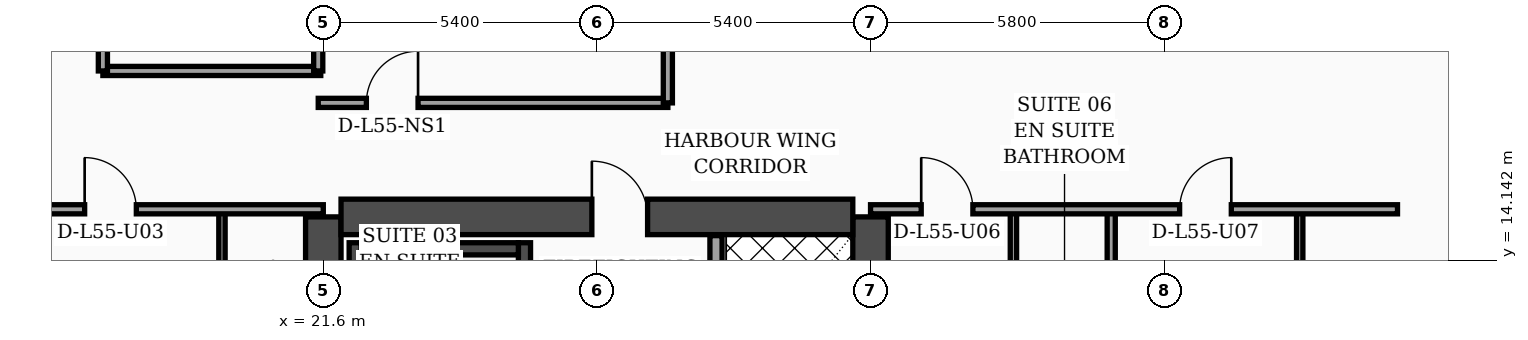
"""IFC4 building model, lengths in metres.
Left out: names, types, materials, properties, quantities, classifications, styles, units other than length and angle.
Written with IfcOpenShell. Run it as: python <this file> out.ifc"""

import sys

from ifc_helpers import new_model, si_unit, direction, frame, frame_2d, origin, place, context, subcontext, project, spatial, rectangle, extrude, element, fill, save


model = new_model("IFC4")
c1 = context("Model", 3, precision=1e-05, world=origin(), true_north=direction((0.0, 1.0)))
c2 = subcontext(c1, "Body", "Model", "MODEL_VIEW")
j1 = project(units=[si_unit("LENGTHUNIT", "METRE"), si_unit("PLANEANGLEUNIT", "RADIAN")], contexts=[c1])
p1 = place(None, origin())
s1 = spatial("IfcSite", under=j1, at=p1, CompositionType="ELEMENT")
p2 = place(p1, origin())
s2 = spatial("IfcBuilding", under=s1, at=p2, CompositionType="ELEMENT")
p3 = place(p2, frame((0.0, 0.0, 223.1)))
s3 = spatial("IfcBuildingStorey", under=s2, at=p3, CompositionType="ELEMENT", Elevation=223.1)
for number, where, z_axis, x_axis in (
    (1, (21.6, 4.6, 0.0), (0.0, 0.0, 1.0), (0.0, 1.0, 0.0)),
    (2, (32.4, 4.6, 0.0), (0.0, 0.0, 1.0), (0.0, 1.0, 0.0)),
):
    element("IfcWall", number, at=place(p3, frame(where, z_axis=z_axis, x_axis=x_axis)), inside=s3, PredefinedType="SHEAR", context=c2, shape_type="SweptSolid", body=[
        extrude(rectangle(XDim=10.4, YDim=0.7, at=frame_2d((5.2, 0.0))), origin(), (0.0, 0.0, 1.0), 3.56),
    ])
p4 = place(p3, frame((21.95, 15.0, 0.0), z_axis=(0.0, 0.0, 1.0), x_axis=(1.0, 0.0, 0.0)))
e3 = element("IfcWall", 3, at=p4, inside=s3, PredefinedType="SHEAR", context=c2, shape_type="SweptSolid", body=[
    extrude(rectangle(XDim=10.1, YDim=0.7, at=frame_2d((5.05, 0.0))), origin(), (0.0, 0.0, 1.0), 3.56),
])
p5 = place(p4, frame((4.95, 0.0, 0.0)))
e4 = element("IfcOpeningElement", 4, at=p5, cuts=e3, PredefinedType="OPENING", context=c2, shape_type="SweptSolid", body=[
    extrude(rectangle(XDim=1.1, YDim=2.2, at=frame_2d((0.55, 1.1))), frame((0.0, 0.36, 0.0), z_axis=(0.0, -1.0, 0.0), x_axis=(1.0, 0.0, 0.0)), (0.0, 0.0, 1.0), 0.72),
])
p6 = place(p3, frame((22.23, 4.95, 0.0), z_axis=(0.0, 0.0, 1.0), x_axis=(0.0, 1.0, 0.0)))
e5 = element("IfcWall", 5, at=p6, inside=s3, PredefinedType="SOLIDWALL", context=c2, shape_type="SweptSolid", body=[
    extrude(rectangle(XDim=9.54, YDim=0.24, at=frame_2d((4.77, 0.0))), origin(), (0.0, 0.0, 1.0), 3.56),
])
p7 = place(p3, frame((25.57, 4.95, 0.0), z_axis=(0.0, 0.0, 1.0), x_axis=(0.0, 1.0, 0.0)))
e6 = element("IfcWall", 6, at=p7, inside=s3, PredefinedType="SOLIDWALL", context=c2, shape_type="SweptSolid", body=[
    extrude(rectangle(XDim=9.54, YDim=0.24, at=frame_2d((4.77, 0.0))), origin(), (0.0, 0.0, 1.0), 3.56),
])
p8 = place(p7, frame((0.35, 0.0, 0.0)))
e7 = element("IfcOpeningElement", 7, at=p8, cuts=e6, PredefinedType="OPENING", context=c2, shape_type="SweptSolid", body=[
    extrude(rectangle(XDim=1.15, YDim=2.2, at=frame_2d((0.575, 1.1))), frame((0.0, 0.13, 0.0), z_axis=(0.0, -1.0, 0.0), x_axis=(1.0, 0.0, 0.0)), (0.0, 0.0, 1.0), 0.26),
])
p9 = place(p3, frame((22.35, 14.37, 0.0), z_axis=(0.0, 0.0, 1.0), x_axis=(1.0, 0.0, 0.0)))
e8 = element("IfcWall", 8, at=p9, inside=s3, PredefinedType="SOLIDWALL", context=c2, shape_type="SweptSolid", body=[
    extrude(rectangle(XDim=3.1, YDim=0.24, at=frame_2d((1.55, 0.0))), origin(), (0.0, 0.0, 1.0), 3.56),
])
p10 = place(p3, frame((49.43, 5.505, 0.0), z_axis=(0.0, 0.0, 1.0), x_axis=(-0.300509063924, 0.953778958931, 0.0)))
e9 = element("IfcWall", 9, at=p10, inside=s3, PredefinedType="SOLIDWALL", context=c2, shape_type="SweptSolid", body=[
    extrude(rectangle(XDim=30.814, YDim=0.32, at=frame_2d((15.407, 0.0))), origin(), (0.0, 0.0, 1.0), 3.56),
])
p11 = place(p10, frame((10.199, 0.0, 0.0)))
e10 = element("IfcOpeningElement", 10, at=p11, cuts=e9, PredefinedType="OPENING", context=c2, shape_type="SweptSolid", body=[
    extrude(rectangle(XDim=1.4, YDim=2.25, at=frame_2d((0.7, 1.125))), frame((0.0, 0.17, 0.0), z_axis=(0.0, -1.0, 0.0), x_axis=(1.0, 0.0, 0.0)), (0.0, 0.0, 1.0), 0.34),
])
p12 = place(p10, frame((4.437, 0.0, 0.7)))
e11 = element("IfcOpeningElement", 11, at=p12, cuts=e9, PredefinedType="OPENING", context=c2, shape_type="SweptSolid", body=[
    extrude(rectangle(XDim=1.6, YDim=1.65, at=frame_2d((0.8, 0.825))), frame((0.0, 0.17, 0.0), z_axis=(0.0, -1.0, 0.0), x_axis=(1.0, 0.0, 0.0)), (0.0, 0.0, 1.0), 0.34),
])
p13 = place(p10, frame((18.696, 0.0, 0.7)))
e12 = element("IfcOpeningElement", 12, at=p13, cuts=e9, PredefinedType="OPENING", context=c2, shape_type="SweptSolid", body=[
    extrude(rectangle(XDim=1.6, YDim=1.65, at=frame_2d((0.8, 0.825))), frame((0.0, 0.17, 0.0), z_axis=(0.0, -1.0, 0.0), x_axis=(1.0, 0.0, 0.0)), (0.0, 0.0, 1.0), 0.34),
])
p14 = place(p10, frame((1.6, 0.0, 0.75)))
e13 = element("IfcOpeningElement", 13, at=p14, cuts=e9, PredefinedType="OPENING", context=c2, shape_type="SweptSolid", body=[
    extrude(rectangle(XDim=1.5, YDim=1.6, at=frame_2d((0.75, 0.8))), frame((0.0, 0.17, 0.0), z_axis=(0.0, -1.0, 0.0), x_axis=(1.0, 0.0, 0.0)), (0.0, 0.0, 1.0), 0.34),
])
p15 = place(p10, frame((7.8, 0.0, 0.75)))
e14 = element("IfcOpeningElement", 14, at=p15, cuts=e9, PredefinedType="OPENING", context=c2, shape_type="SweptSolid", body=[
    extrude(rectangle(XDim=1.5, YDim=1.6, at=frame_2d((0.75, 0.8))), frame((0.0, 0.17, 0.0), z_axis=(0.0, -1.0, 0.0), x_axis=(1.0, 0.0, 0.0)), (0.0, 0.0, 1.0), 0.34),
])
p16 = place(p10, frame((14.0, 0.0, 0.75)))
e15 = element("IfcOpeningElement", 15, at=p16, cuts=e9, PredefinedType="OPENING", context=c2, shape_type="SweptSolid", body=[
    extrude(rectangle(XDim=1.5, YDim=1.6, at=frame_2d((0.75, 0.8))), frame((0.0, 0.17, 0.0), z_axis=(0.0, -1.0, 0.0), x_axis=(1.0, 0.0, 0.0)), (0.0, 0.0, 1.0), 0.34),
])
p17 = place(p10, frame((16.55, 0.0, 0.75)))
e16 = element("IfcOpeningElement", 16, at=p17, cuts=e9, PredefinedType="OPENING", context=c2, shape_type="SweptSolid", body=[
    extrude(rectangle(XDim=1.5, YDim=1.6, at=frame_2d((0.75, 0.8))), frame((0.0, 0.17, 0.0), z_axis=(0.0, -1.0, 0.0), x_axis=(1.0, 0.0, 0.0)), (0.0, 0.0, 1.0), 0.34),
])
p18 = place(p10, frame((20.75, 0.0, 0.75)))
e17 = element("IfcOpeningElement", 17, at=p18, cuts=e9, PredefinedType="OPENING", context=c2, shape_type="SweptSolid", body=[
    extrude(rectangle(XDim=1.5, YDim=1.6, at=frame_2d((0.75, 0.8))), frame((0.0, 0.17, 0.0), z_axis=(0.0, -1.0, 0.0), x_axis=(1.0, 0.0, 0.0)), (0.0, 0.0, 1.0), 0.34),
])
p19 = place(p10, frame((23.3, 0.0, 0.75)))
e18 = element("IfcOpeningElement", 18, at=p19, cuts=e9, PredefinedType="OPENING", context=c2, shape_type="SweptSolid", body=[
    extrude(rectangle(XDim=1.5, YDim=1.6, at=frame_2d((0.75, 0.8))), frame((0.0, 0.17, 0.0), z_axis=(0.0, -1.0, 0.0), x_axis=(1.0, 0.0, 0.0)), (0.0, 0.0, 1.0), 0.34),
])
p20 = place(p10, frame((26.4, 0.0, 0.75)))
e19 = element("IfcOpeningElement", 19, at=p20, cuts=e9, PredefinedType="OPENING", context=c2, shape_type="SweptSolid", body=[
    extrude(rectangle(XDim=1.5, YDim=1.6, at=frame_2d((0.75, 0.8))), frame((0.0, 0.17, 0.0), z_axis=(0.0, -1.0, 0.0), x_axis=(1.0, 0.0, 0.0)), (0.0, 0.0, 1.0), 0.34),
])
p21 = place(p3, frame((29.35, 4.97, 0.0), z_axis=(0.0, 0.0, 1.0), x_axis=(0.0, 1.0, 0.0)))
e20 = element("IfcWall", 20, at=p21, inside=s3, PredefinedType="SOLIDWALL", context=c2, shape_type="SweptSolid", body=[
    extrude(rectangle(XDim=9.66, YDim=0.24, at=frame_2d((4.83, 0.0))), origin(), (0.0, 0.0, 1.0), 3.56),
])
p22 = place(p21, frame((0.55, 0.0, 0.0)))
e21 = element("IfcOpeningElement", 21, at=p22, cuts=e20, PredefinedType="OPENING", context=c2, shape_type="SweptSolid", body=[
    extrude(rectangle(XDim=1.3, YDim=2.35, at=frame_2d((0.65, 1.175))), frame((0.0, 0.13, 0.0), z_axis=(0.0, -1.0, 0.0), x_axis=(1.0, 0.0, 0.0)), (0.0, 0.0, 1.0), 0.26),
])
p23 = place(p3, frame((19.6, 2.44, 0.0), z_axis=(0.0, 0.0, 1.0), x_axis=(0.0, 1.0, 0.0)))
e22 = element("IfcWall", 22, at=p23, inside=s3, PredefinedType="PARTITIONING", context=c2, shape_type="SweptSolid", body=[
    extrude(rectangle(XDim=12.71, YDim=0.125, at=frame_2d((6.355, 0.0))), origin(), (0.0, 0.0, 1.0), 2.59),
])
p24 = place(p23, frame((4.34, 0.0, 0.0)))
e23 = element("IfcOpeningElement", 23, at=p24, cuts=e22, PredefinedType="OPENING", context=c2, shape_type="SweptSolid", body=[
    extrude(rectangle(XDim=0.96, YDim=2.2, at=frame_2d((0.48, 1.1))), frame((0.0, 0.073, 0.0), z_axis=(0.0, -1.0, 0.0), x_axis=(1.0, 0.0, 0.0)), (0.0, 0.0, 1.0), 0.145),
])
p25 = place(p23, frame((10.18, 0.0, 0.0)))
e24 = element("IfcOpeningElement", 24, at=p25, cuts=e22, PredefinedType="OPENING", context=c2, shape_type="SweptSolid", body=[
    extrude(rectangle(XDim=0.9, YDim=2.15, at=frame_2d((0.45, 1.075))), frame((0.0, 0.073, 0.0), z_axis=(0.0, -1.0, 0.0), x_axis=(1.0, 0.0, 0.0)), (0.0, 0.0, 1.0), 0.145),
])
p26 = place(p3, frame((15.15, 15.15, 0.0), z_axis=(0.0, 0.0, 1.0), x_axis=(1.0, 0.0, 0.0)))
e25 = element("IfcWall", 25, at=p26, inside=s3, PredefinedType="PARTITIONING", context=c2, shape_type="SweptSolid", body=[
    extrude(rectangle(XDim=6.45, YDim=0.18, at=frame_2d((3.225, 0.0))), origin(), (0.0, 0.0, 1.0), 2.59),
])
p27 = place(p26, frame((1.74, 0.0, 0.0)))
e26 = element("IfcOpeningElement", 26, at=p27, cuts=e25, PredefinedType="OPENING", context=c2, shape_type="SweptSolid", body=[
    extrude(rectangle(XDim=1.02, YDim=2.2, at=frame_2d((0.51, 1.1))), frame((0.0, 0.1, 0.0), z_axis=(0.0, -1.0, 0.0), x_axis=(1.0, 0.0, 0.0)), (0.0, 0.0, 1.0), 0.2),
])
p28 = place(p3, frame((17.25, 17.88, 0.0), z_axis=(0.0, 0.0, 1.0), x_axis=(1.0, 0.0, 0.0)))
e27 = element("IfcWall", 27, at=p28, inside=s3, PredefinedType="PARTITIONING", context=c2, shape_type="SweptSolid", body=[
    extrude(rectangle(XDim=4.3, YDim=0.18, at=frame_2d((2.15, 0.0))), origin(), (0.0, 0.0, 1.0), 3.09),
])
p29 = place(p3, frame((21.5, 17.88, 0.0), z_axis=(0.0, 0.0, 1.0), x_axis=(0.0, 1.0, 0.0)))
e28 = element("IfcWall", 28, at=p29, inside=s3, PredefinedType="PARTITIONING", context=c2, shape_type="SweptSolid", body=[
    extrude(rectangle(XDim=6.44, YDim=0.18, at=frame_2d((3.22, 0.0))), origin(), (0.0, 0.0, 1.0), 3.09),
])
p30 = place(p3, frame((17.25, 17.88, 0.0), z_axis=(0.0, 0.0, 1.0), x_axis=(0.0, 1.0, 0.0)))
e29 = element("IfcWall", 29, at=p30, inside=s3, PredefinedType="PARTITIONING", context=c2, shape_type="SweptSolid", body=[
    extrude(rectangle(XDim=6.44, YDim=0.18, at=frame_2d((3.22, 0.0))), origin(), (0.0, 0.0, 1.0), 3.09),
])
p31 = place(p30, frame((0.65, 0.0, 0.0)))
e30 = element("IfcOpeningElement", 30, at=p31, cuts=e29, PredefinedType="OPENING", context=c2, shape_type="SweptSolid", body=[
    extrude(rectangle(XDim=0.98, YDim=2.15, at=frame_2d((0.49, 1.075))), frame((0.0, 0.1, 0.0), z_axis=(0.0, -1.0, 0.0), x_axis=(1.0, 0.0, 0.0)), (0.0, 0.0, 1.0), 0.2),
])
p32 = place(p30, frame((3.27, 0.0, 0.0)))
e31 = element("IfcOpeningElement", 31, at=p32, cuts=e29, PredefinedType="OPENING", context=c2, shape_type="SweptSolid", body=[
    extrude(rectangle(XDim=0.96, YDim=2.2, at=frame_2d((0.48, 1.1))), frame((0.0, 0.1, 0.0), z_axis=(0.0, -1.0, 0.0), x_axis=(1.0, 0.0, 0.0)), (0.0, 0.0, 1.0), 0.2),
])
p33 = place(p3, frame((35.22, 2.44, 0.0), z_axis=(0.0, 0.0, 1.0), x_axis=(0.0, 1.0, 0.0)))
e32 = element("IfcWall", 32, at=p33, inside=s3, PredefinedType="PARTITIONING", context=c2, shape_type="SweptSolid", body=[
    extrude(rectangle(XDim=12.71, YDim=0.125, at=frame_2d((6.355, 0.0))), origin(), (0.0, 0.0, 1.0), 2.94),
])
p34 = place(p33, frame((4.35, 0.0, 0.0)))
e33 = element("IfcOpeningElement", 33, at=p34, cuts=e32, PredefinedType="OPENING", context=c2, shape_type="SweptSolid", body=[
    extrude(rectangle(XDim=0.96, YDim=2.2, at=frame_2d((0.48, 1.1))), frame((0.0, 0.073, 0.0), z_axis=(0.0, -1.0, 0.0), x_axis=(1.0, 0.0, 0.0)), (0.0, 0.0, 1.0), 0.145),
])
p35 = place(p33, frame((10.21, 0.0, 0.0)))
e34 = element("IfcOpeningElement", 34, at=p35, cuts=e32, PredefinedType="OPENING", context=c2, shape_type="SweptSolid", body=[
    extrude(rectangle(XDim=0.9, YDim=2.15, at=frame_2d((0.45, 1.075))), frame((0.0, 0.073, 0.0), z_axis=(0.0, -1.0, 0.0), x_axis=(1.0, 0.0, 0.0)), (0.0, 0.0, 1.0), 0.145),
])
p36 = place(p3, frame((40.87, 2.44, 0.0), z_axis=(0.0, 0.0, 1.0), x_axis=(0.0, 1.0, 0.0)))
e35 = element("IfcWall", 35, at=p36, inside=s3, PredefinedType="PARTITIONING", context=c2, shape_type="SweptSolid", body=[
    extrude(rectangle(XDim=12.71, YDim=0.125, at=frame_2d((6.355, 0.0))), origin(), (0.0, 0.0, 1.0), 2.94),
])
p37 = place(p36, frame((4.35, 0.0, 0.0)))
e36 = element("IfcOpeningElement", 36, at=p37, cuts=e35, PredefinedType="OPENING", context=c2, shape_type="SweptSolid", body=[
    extrude(rectangle(XDim=0.96, YDim=2.2, at=frame_2d((0.48, 1.1))), frame((0.0, 0.073, 0.0), z_axis=(0.0, -1.0, 0.0), x_axis=(1.0, 0.0, 0.0)), (0.0, 0.0, 1.0), 0.145),
])
p38 = place(p36, frame((10.21, 0.0, 0.0)))
e37 = element("IfcOpeningElement", 37, at=p38, cuts=e35, PredefinedType="OPENING", context=c2, shape_type="SweptSolid", body=[
    extrude(rectangle(XDim=0.9, YDim=2.15, at=frame_2d((0.45, 1.075))), frame((0.0, 0.073, 0.0), z_axis=(0.0, -1.0, 0.0), x_axis=(1.0, 0.0, 0.0)), (0.0, 0.0, 1.0), 0.145),
])
p39 = place(p3, frame((37.15, 2.44, 0.0), z_axis=(0.0, 0.0, 1.0), x_axis=(0.0, 1.0, 0.0)))
e38 = element("IfcWall", 38, at=p39, inside=s3, PredefinedType="PARTITIONING", context=c2, shape_type="SweptSolid", body=[
    extrude(rectangle(XDim=12.71, YDim=0.16, at=frame_2d((6.355, 0.0))), origin(), (0.0, 0.0, 1.0), 2.94),
])
p40 = place(p3, frame((32.4, 15.15, 0.0), z_axis=(0.0, 0.0, 1.0), x_axis=(1.0, 0.0, 0.0)))
e39 = element("IfcWall", 39, at=p40, inside=s3, PredefinedType="PARTITIONING", context=c2, shape_type="SweptSolid", body=[
    extrude(rectangle(XDim=10.4, YDim=0.18, at=frame_2d((5.2, 0.0))), origin(), (0.0, 0.0, 1.0), 2.94),
])
p41 = place(p40, frame((1.0, 0.0, 0.0)))
e40 = element("IfcOpeningElement", 40, at=p41, cuts=e39, PredefinedType="OPENING", context=c2, shape_type="SweptSolid", body=[
    extrude(rectangle(XDim=1.02, YDim=2.2, at=frame_2d((0.51, 1.1))), frame((0.0, 0.1, 0.0), z_axis=(0.0, -1.0, 0.0), x_axis=(1.0, 0.0, 0.0)), (0.0, 0.0, 1.0), 0.2),
])
p42 = place(p40, frame((6.1, 0.0, 0.0)))
e41 = element("IfcOpeningElement", 41, at=p42, cuts=e39, PredefinedType="OPENING", context=c2, shape_type="SweptSolid", body=[
    extrude(rectangle(XDim=1.02, YDim=2.2, at=frame_2d((0.51, 1.1))), frame((0.0, 0.1, 0.0), z_axis=(0.0, -1.0, 0.0), x_axis=(1.0, 0.0, 0.0)), (0.0, 0.0, 1.0), 0.2),
])
p43 = place(p3, frame((21.5, 17.25, 0.0), z_axis=(0.0, 0.0, 1.0), x_axis=(1.0, 0.0, 0.0)))
e42 = element("IfcWall", 42, at=p43, inside=s3, PredefinedType="PARTITIONING", context=c2, shape_type="SweptSolid", body=[
    extrude(rectangle(XDim=6.9, YDim=0.18, at=frame_2d((3.45, 0.0))), origin(), (0.0, 0.0, 1.0), 2.94),
])
p44 = place(p43, frame((0.95, 0.0, 0.0)))
e43 = element("IfcOpeningElement", 43, at=p44, cuts=e42, PredefinedType="OPENING", context=c2, shape_type="SweptSolid", body=[
    extrude(rectangle(XDim=1.02, YDim=2.2, at=frame_2d((0.51, 1.1))), frame((0.0, 0.1, 0.0), z_axis=(0.0, -1.0, 0.0), x_axis=(1.0, 0.0, 0.0)), (0.0, 0.0, 1.0), 0.2),
])
p45 = place(p3, frame((28.4, 17.25, 0.0), z_axis=(0.0, 0.0, 1.0), x_axis=(0.0, 1.0, 0.0)))
e44 = element("IfcWall", 44, at=p45, inside=s3, PredefinedType="PARTITIONING", context=c2, shape_type="SweptSolid", body=[
    extrude(rectangle(XDim=13.56, YDim=0.18, at=frame_2d((6.78, 0.0))), origin(), (0.0, 0.0, 1.0), 2.94),
])
p46 = place(p27, origin())
e45 = element("IfcDoor", 45, at=p46, inside=s3, OperationType="SINGLE_SWING_LEFT", PredefinedType="DOOR", context=c2, shape_type="SweptSolid", body=[
    extrude(rectangle(XDim=1.02, YDim=2.2, at=frame_2d((0.51, 1.1))), frame((0.0, 0.025, 0.0), z_axis=(0.0, -1.0, 0.0), x_axis=(1.0, 0.0, 0.0)), (0.0, 0.0, 1.0), 0.05),
])
fill(e26, e45)
p47 = place(p41, origin())
e46 = element("IfcDoor", 46, at=p47, inside=s3, OperationType="SINGLE_SWING_LEFT", PredefinedType="DOOR", context=c2, shape_type="SweptSolid", body=[
    extrude(rectangle(XDim=1.02, YDim=2.2, at=frame_2d((0.51, 1.1))), frame((0.0, 0.025, 0.0), z_axis=(0.0, -1.0, 0.0), x_axis=(1.0, 0.0, 0.0)), (0.0, 0.0, 1.0), 0.05),
])
fill(e40, e46)
p48 = place(p42, origin())
e47 = element("IfcDoor", 47, at=p48, inside=s3, OperationType="SINGLE_SWING_RIGHT", PredefinedType="DOOR", context=c2, shape_type="SweptSolid", body=[
    extrude(rectangle(XDim=1.02, YDim=2.2, at=frame_2d((0.51, 1.1))), frame((0.0, 0.025, 0.0), z_axis=(0.0, -1.0, 0.0), x_axis=(1.0, 0.0, 0.0)), (0.0, 0.0, 1.0), 0.05),
])
fill(e41, e47)
p49 = place(p44, origin())
e48 = element("IfcDoor", 48, at=p49, inside=s3, OperationType="SINGLE_SWING_RIGHT", PredefinedType="DOOR", context=c2, shape_type="SweptSolid", body=[
    extrude(rectangle(XDim=1.02, YDim=2.2, at=frame_2d((0.51, 1.1))), frame((0.0, 0.025, 0.0), z_axis=(0.0, -1.0, 0.0), x_axis=(1.0, 0.0, 0.0)), (0.0, 0.0, 1.0), 0.05),
])
fill(e43, e48)
p50 = place(p5, origin())
e49 = element("IfcDoor", 49, at=p50, inside=s3, OperationType="SINGLE_SWING_LEFT", PredefinedType="DOOR", context=c2, shape_type="SweptSolid", body=[
    extrude(rectangle(XDim=1.1, YDim=2.2, at=frame_2d((0.55, 1.1))), frame((0.0, 0.025, 0.0), z_axis=(0.0, -1.0, 0.0), x_axis=(1.0, 0.0, 0.0)), (0.0, 0.0, 1.0), 0.05),
])
fill(e4, e49)
save(model, sys.argv[1])
